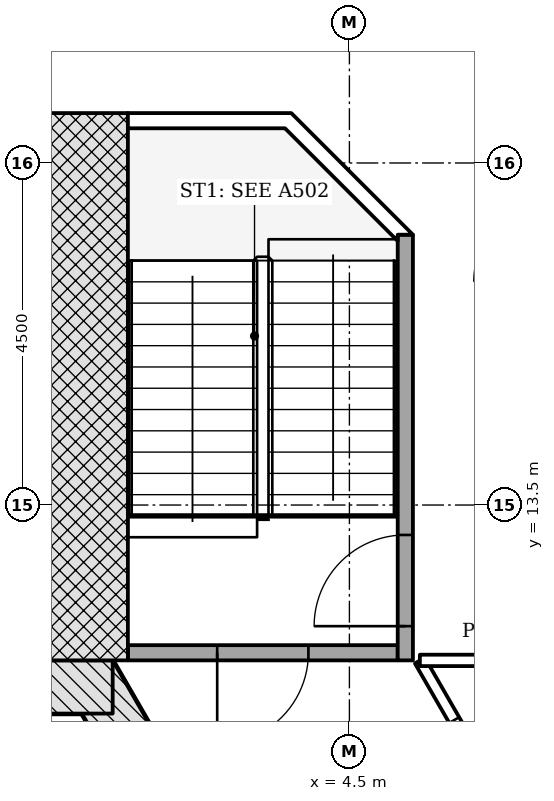
"""IFC4 building model, lengths in metres.
Left out: names, types, materials, properties, quantities, classifications, styles, units other than length and angle.
Written with IfcOpenShell. Run it as: python <this file> out.ifc"""

import sys

from ifc_helpers import new_model, si_unit, direction, frame, frame_2d, origin, place, context, subcontext, project, spatial, polyline, rectangle, outline, extrude, element, fill, save


model = new_model("IFC4")
c1 = context("Model", 3, precision=1e-05, world=origin(), true_north=direction((0.0, 1.0)))
c2 = subcontext(c1, "Body", "Model", "MODEL_VIEW")
j1 = project(units=[si_unit("LENGTHUNIT", "METRE"), si_unit("PLANEANGLEUNIT", "RADIAN")], contexts=[c1])
p1 = place(None, origin())
s1 = spatial("IfcSite", under=j1, at=p1, CompositionType="ELEMENT")
p2 = place(p1, origin())
s2 = spatial("IfcBuilding", under=s1, at=p2, CompositionType="ELEMENT")
p3 = place(p2, frame((0.0, 0.0, 10.5)))
s3 = spatial("IfcBuildingStorey", under=s2, at=p3, CompositionType="ELEMENT", Elevation=10.5)
p4 = place(p3, frame((10.311, -4.703, -0.25), z_axis=(0.0, 0.0, 1.0), x_axis=(-0.500001446645, 0.866024568562, 0.0)))
e1 = element("IfcWall", 1, at=p4, inside=s3, PredefinedType="SHEAR", context=c2, shape_type="SweptSolid", body=[
    extrude(rectangle(XDim=18.458, YDim=0.7, at=frame_2d((9.229, 0.0))), origin(), (0.0, 0.0, 1.0), 4.5),
])
p5 = place(p4, frame((8.7, 0.0, 0.25)))
e2 = element("IfcOpeningElement", 2, at=p5, cuts=e1, PredefinedType="OPENING", context=c2, shape_type="SweptSolid", body=[
    extrude(rectangle(XDim=1.0, YDim=2.1, at=frame_2d((0.5, 1.05))), frame((0.0, 0.36, 0.0), z_axis=(0.0, -1.0, 0.0), x_axis=(1.0, 0.0, 0.0)), (0.0, 0.0, 1.0), 0.72),
])
p6 = place(p4, frame((4.002, 0.0, 0.25)))
e3 = element("IfcOpeningElement", 3, at=p6, cuts=e1, PredefinedType="OPENING", context=c2, shape_type="SweptSolid", body=[
    extrude(rectangle(XDim=0.9, YDim=2.1, at=frame_2d((0.45, 1.05))), frame((0.0, 0.36, 0.0), z_axis=(0.0, -1.0, 0.0), x_axis=(1.0, 0.0, 0.0)), (0.0, 0.0, 1.0), 0.72),
])
p7 = place(p4, frame((14.093, 0.0, 0.25)))
e4 = element("IfcOpeningElement", 4, at=p7, cuts=e1, PredefinedType="OPENING", context=c2, shape_type="SweptSolid", body=[
    extrude(rectangle(XDim=0.9, YDim=2.1, at=frame_2d((0.45, 1.05))), frame((0.0, 0.36, 0.0), z_axis=(0.0, -1.0, 0.0), x_axis=(1.0, 0.0, 0.0)), (0.0, 0.0, 1.0), 0.72),
])
p8 = place(p3, frame((1.386, 11.106, -0.25), z_axis=(0.0, 0.0, 1.0), x_axis=(-1.0, 0.0, 0.0)))
e5 = element("IfcWall", 5, at=p8, inside=s3, PredefinedType="SHEAR", context=c2, shape_type="SweptSolid", body=[
    extrude(rectangle(XDim=2.771, YDim=0.7, at=frame_2d((1.386, 0.0))), origin(), (0.0, 0.0, 1.0), 4.5),
])
p9 = place(p3, frame((5.135, 11.556, -0.25), z_axis=(0.0, 0.0, 1.0), x_axis=(-1.0, 0.0, 0.0)))
e6 = element("IfcWall", 6, at=p9, inside=s3, PredefinedType="SHEAR", context=c2, shape_type="SweptSolid", body=[
    extrude(rectangle(XDim=3.55, YDim=0.2, at=frame_2d((1.775, 0.0))), origin(), (0.0, 0.0, 1.0), 4.5),
])
p10 = place(p9, frame((1.175, 0.0, 0.25)))
e7 = element("IfcOpeningElement", 7, at=p10, cuts=e6, PredefinedType="OPENING", context=c2, shape_type="SweptSolid", body=[
    extrude(rectangle(XDim=1.2, YDim=2.1, at=frame_2d((0.6, 1.05))), frame((0.0, 0.11, 0.0), z_axis=(0.0, -1.0, 0.0), x_axis=(1.0, 0.0, 0.0)), (0.0, 0.0, 1.0), 0.22),
])
p11 = place(p3, frame((5.236, 11.456, -0.25), z_axis=(0.0, 0.0, 1.0), x_axis=(0.0, 1.0, 0.0)))
e8 = element("IfcWall", 8, at=p11, inside=s3, PredefinedType="SHEAR", context=c2, shape_type="SweptSolid", body=[
    extrude(rectangle(XDim=5.6, YDim=0.2, at=frame_2d((2.8, 0.0))), origin(), (0.0, 0.0, 1.0), 4.5),
])
p12 = place(p11, frame((0.45, 0.0, 0.25)))
e9 = element("IfcOpeningElement", 9, at=p12, cuts=e8, PredefinedType="OPENING", context=c2, shape_type="SweptSolid", body=[
    extrude(rectangle(XDim=1.2, YDim=2.1, at=frame_2d((0.6, 1.05))), frame((0.0, 0.11, 0.0), z_axis=(0.0, -1.0, 0.0), x_axis=(1.0, 0.0, 0.0)), (0.0, 0.0, 1.0), 0.22),
])
p13 = place(p3, frame((1.018, 11.456, -0.25), z_axis=(0.0, 0.0, 1.0), x_axis=(0.0, 1.0, 0.0)))
e10 = element("IfcWall", 10, at=p13, inside=s3, PredefinedType="SHEAR", context=c2, shape_type="SweptSolid", body=[
    extrude(rectangle(XDim=7.2, YDim=1.136, at=frame_2d((3.6, 0.0))), origin(), (0.0, 0.0, 1.0), 4.5),
])
p14 = place(p3, frame((0.0, 0.0, -0.25)))
e11 = element("IfcWall", 11, at=p14, inside=s3, PredefinedType="SHEAR", context=c2, shape_type="SweptSolid", body=[
    extrude(outline(polyline([(5.336, 17.056), (3.736, 18.656), (1.586, 18.656), (1.586, 18.456), (3.653, 18.456), (5.135, 16.974), (5.135, 17.056), (5.135, 17.056), (5.135, 17.056), (5.135, 17.056), (5.135, 17.056), (5.135, 17.056), (5.135, 17.056), (5.135, 17.056), (5.135, 17.056), (5.135, 17.056), (5.135, 17.056), (5.135, 17.056), (5.135, 17.056), (5.135, 17.056), (5.135, 17.056), (5.135, 17.056), (5.135, 17.056), (5.336, 17.056)])), origin(), (0.0, 0.0, 1.0), 4.5),
])
p15 = place(p3, frame((6.854, 8.982, 0.0), z_axis=(0.0, 0.0, 1.0), x_axis=(-0.499919889281, 0.866071650789, 0.0)))
e12 = element("IfcWall", 12, at=p15, inside=s3, PredefinedType="PARTITIONING", context=c2, shape_type="SweptSolid", body=[
    extrude(rectangle(XDim=2.854, YDim=0.15, at=frame_2d((1.427, 0.0))), origin(), (0.0, 0.0, 1.0), 3.638),
])
p16 = place(p15, frame((0.95, 0.0, 0.0)))
e13 = element("IfcOpeningElement", 13, at=p16, cuts=e12, PredefinedType="OPENING", context=c2, shape_type="SweptSolid", body=[
    extrude(rectangle(XDim=1.0, YDim=2.1, at=frame_2d((0.5, 1.05))), frame((0.0, 0.085, 0.0), z_axis=(0.0, -1.0, 0.0), x_axis=(1.0, 0.0, 0.0)), (0.0, 0.0, 1.0), 0.17),
])
p17 = place(p3, frame((5.427, 11.456, 0.0), z_axis=(0.0, 0.0, 1.0), x_axis=(1.0, 0.0, 0.0)))
e14 = element("IfcWall", 14, at=p17, inside=s3, PredefinedType="PARTITIONING", context=c2, shape_type="SweptSolid", body=[
    extrude(rectangle(XDim=1.708, YDim=0.15, at=frame_2d((0.854, 0.0))), origin(), (0.0, 0.0, 1.0), 4.25),
])
p18 = place(p10, origin())
e15 = element("IfcDoor", 15, at=p18, inside=s3, OperationType="SINGLE_SWING_RIGHT", PredefinedType="DOOR", context=c2, shape_type="SweptSolid", body=[
    extrude(rectangle(XDim=1.2, YDim=2.1, at=frame_2d((0.6, 1.05))), frame((0.0, 0.025, 0.0), z_axis=(0.0, -1.0, 0.0), x_axis=(1.0, 0.0, 0.0)), (0.0, 0.0, 1.0), 0.05),
])
fill(e7, e15)
p19 = place(p12, origin())
e16 = element("IfcDoor", 16, at=p19, inside=s3, OperationType="SINGLE_SWING_LEFT", PredefinedType="DOOR", context=c2, shape_type="SweptSolid", body=[
    extrude(rectangle(XDim=1.2, YDim=2.1, at=frame_2d((0.6, 1.05))), frame((0.0, 0.025, 0.0), z_axis=(0.0, -1.0, 0.0), x_axis=(1.0, 0.0, 0.0)), (0.0, 0.0, 1.0), 0.05),
])
fill(e9, e16)
p20 = place(p16, origin())
e17 = element("IfcDoor", 17, at=p20, inside=s3, OperationType="SINGLE_SWING_LEFT", PredefinedType="DOOR", context=c2, shape_type="SweptSolid", body=[
    extrude(rectangle(XDim=1.0, YDim=2.1, at=frame_2d((0.5, 1.05))), frame((0.0, 0.025, 0.0), z_axis=(0.0, -1.0, 0.0), x_axis=(1.0, 0.0, 0.0)), (0.0, 0.0, 1.0), 0.05),
])
fill(e13, e17)
save(model, sys.argv[1])
